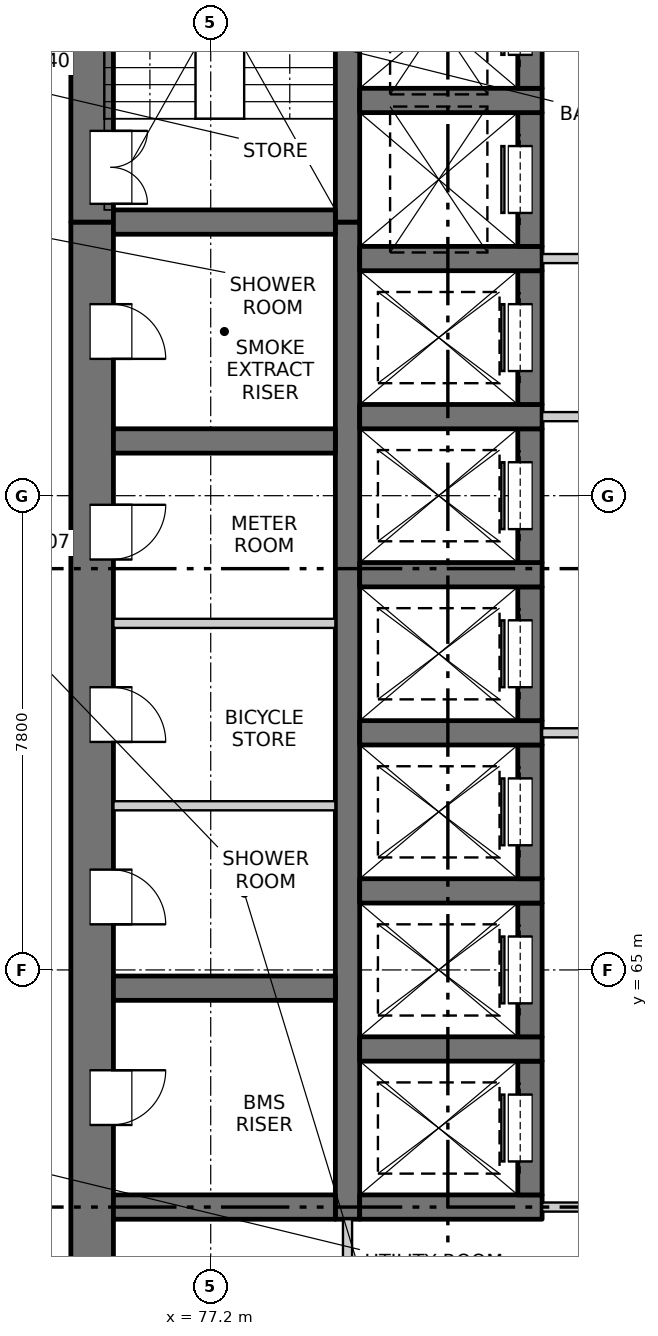
"""IFC4 building model, lengths in metres.
Left out: names, types, materials, properties, quantities, classifications, styles, units other than length and angle.
Written with IfcOpenShell. Run it as: python <this file> out.ifc"""

import sys

from ifc_helpers import new_model, si_unit, direction, frame, frame_2d, origin, place, context, subcontext, project, spatial, rectangle, extrude, element, fill, save


model = new_model("IFC4")
c1 = context("Model", 3, precision=1e-05, world=origin(), true_north=direction((0.0, 1.0)))
c2 = subcontext(c1, "Body", "Model", "MODEL_VIEW")
j1 = project(units=[si_unit("LENGTHUNIT", "METRE"), si_unit("PLANEANGLEUNIT", "RADIAN")], contexts=[c1])
p1 = place(None, origin())
s1 = spatial("IfcSite", under=j1, at=p1, CompositionType="ELEMENT")
p2 = place(p1, origin())
s2 = spatial("IfcBuilding", under=s1, at=p2, CompositionType="ELEMENT")
p3 = place(p2, frame((0.0, 0.0, 36.5)))
s3 = spatial("IfcBuildingStorey", under=s2, at=p3, CompositionType="ELEMENT", Elevation=36.5)
p4 = place(p3, frame((75.25, 54.9, -0.25), z_axis=(0.0, 0.0, 1.0), x_axis=(0.0, 1.0, 0.0)))
e1 = element("IfcWall", 1, at=p4, inside=s3, PredefinedType="SOLIDWALL", context=c2, shape_type="SweptSolid", body=[
    extrude(rectangle(XDim=22.4, YDim=0.7, at=frame_2d((11.2, 0.0))), origin(), (0.0, 0.0, 1.0), 3.4),
])
p5 = place(p4, frame((7.55, 0.0, 0.25)))
e2 = element("IfcOpeningElement", 2, at=p5, cuts=e1, PredefinedType="OPENING", context=c2, shape_type="SweptSolid", body=[
    extrude(rectangle(XDim=0.9, YDim=2.1, at=frame_2d((0.45, 1.05))), frame((0.0, 0.36, 0.0), z_axis=(0.0, -1.0, 0.0), x_axis=(1.0, 0.0, 0.0)), (0.0, 0.0, 1.0), 0.72),
])
p6 = place(p4, frame((10.85, 0.0, 0.25)))
e3 = element("IfcOpeningElement", 3, at=p6, cuts=e1, PredefinedType="OPENING", context=c2, shape_type="SweptSolid", body=[
    extrude(rectangle(XDim=0.9, YDim=2.1, at=frame_2d((0.45, 1.05))), frame((0.0, 0.36, 0.0), z_axis=(0.0, -1.0, 0.0), x_axis=(1.0, 0.0, 0.0)), (0.0, 0.0, 1.0), 0.72),
])
p7 = place(p4, frame((13.85, 0.0, 0.25)))
e4 = element("IfcOpeningElement", 4, at=p7, cuts=e1, PredefinedType="OPENING", context=c2, shape_type="SweptSolid", body=[
    extrude(rectangle(XDim=0.9, YDim=2.1, at=frame_2d((0.45, 1.05))), frame((0.0, 0.36, 0.0), z_axis=(0.0, -1.0, 0.0), x_axis=(1.0, 0.0, 0.0)), (0.0, 0.0, 1.0), 0.72),
])
p8 = place(p4, frame((16.85, 0.0, 0.25)))
e5 = element("IfcOpeningElement", 5, at=p8, cuts=e1, PredefinedType="OPENING", context=c2, shape_type="SweptSolid", body=[
    extrude(rectangle(XDim=0.9, YDim=2.1, at=frame_2d((0.45, 1.05))), frame((0.0, 0.36, 0.0), z_axis=(0.0, -1.0, 0.0), x_axis=(1.0, 0.0, 0.0)), (0.0, 0.0, 1.0), 0.72),
])
p9 = place(p4, frame((20.15, 0.0, 0.25)))
e6 = element("IfcOpeningElement", 6, at=p9, cuts=e1, PredefinedType="OPENING", context=c2, shape_type="SweptSolid", body=[
    extrude(rectangle(XDim=0.9, YDim=2.1, at=frame_2d((0.45, 1.05))), frame((0.0, 0.36, 0.0), z_axis=(0.0, -1.0, 0.0), x_axis=(1.0, 0.0, 0.0)), (0.0, 0.0, 1.0), 0.72),
])
p10 = place(p3, frame((75.25, 77.3, -0.25), z_axis=(0.0, 0.0, 1.0), x_axis=(0.0, 1.0, 0.0)))
e7 = element("IfcWall", 7, at=p10, inside=s3, PredefinedType="SOLIDWALL", context=c2, shape_type="SweptSolid", body=[
    extrude(rectangle(XDim=7.55, YDim=0.7, at=frame_2d((3.775, 0.0))), origin(), (0.0, 0.0, 1.0), 3.4),
])
p11 = place(p10, frame((0.3, 0.0, 0.25)))
e8 = element("IfcOpeningElement", 8, at=p11, cuts=e7, PredefinedType="OPENING", context=c2, shape_type="SweptSolid", body=[
    extrude(rectangle(XDim=1.2, YDim=2.1, at=frame_2d((0.6, 1.05))), frame((0.0, 0.36, 0.0), z_axis=(0.0, -1.0, 0.0), x_axis=(1.0, 0.0, 0.0)), (0.0, 0.0, 1.0), 0.72),
])
p12 = place(p3, frame((79.45, 60.9, -0.25), z_axis=(0.0, 0.0, 1.0), x_axis=(0.0, 1.0, 0.0)))
e9 = element("IfcWall", 9, at=p12, inside=s3, PredefinedType="SOLIDWALL", context=c2, shape_type="SweptSolid", body=[
    extrude(rectangle(XDim=16.4, YDim=0.4, at=frame_2d((8.2, 0.0))), origin(), (0.0, 0.0, 1.0), 3.4),
])
p13 = place(p3, frame((79.45, 77.3, -0.25), z_axis=(0.0, 0.0, 1.0), x_axis=(0.0, 1.0, 0.0)))
e10 = element("IfcWall", 10, at=p13, inside=s3, PredefinedType="SOLIDWALL", context=c2, shape_type="SweptSolid", body=[
    extrude(rectangle(XDim=6.85, YDim=0.4, at=frame_2d((3.425, 0.0))), origin(), (0.0, 0.0, 1.0), 3.4),
])
p14 = place(p3, frame((79.65, 61.1, -0.25), z_axis=(0.0, 0.0, 1.0), x_axis=(1.0, 0.0, 0.0)))
e11 = element("IfcWall", 11, at=p14, inside=s3, PredefinedType="SOLIDWALL", context=c2, shape_type="SweptSolid", body=[
    extrude(rectangle(XDim=3.0, YDim=0.4, at=frame_2d((1.5, 0.0))), origin(), (0.0, 0.0, 1.0), 3.4),
])
p15 = place(p3, frame((82.45, 61.3, -0.25), z_axis=(0.0, 0.0, 1.0), x_axis=(0.0, 1.0, 0.0)))
e12 = element("IfcWall", 12, at=p15, inside=s3, PredefinedType="SOLIDWALL", context=c2, shape_type="SweptSolid", body=[
    extrude(rectangle(XDim=2.2, YDim=0.4, at=frame_2d((1.1, 0.0))), origin(), (0.0, 0.0, 1.0), 3.4),
])
p16 = place(p15, frame((0.55, 0.0, 0.25)))
e13 = element("IfcOpeningElement", 13, at=p16, cuts=e12, PredefinedType="OPENING", context=c2, shape_type="SweptSolid", body=[
    extrude(rectangle(XDim=1.1, YDim=2.1, at=frame_2d((0.55, 1.05))), frame((0.0, 0.21, 0.0), z_axis=(0.0, -1.0, 0.0), x_axis=(1.0, 0.0, 0.0)), (0.0, 0.0, 1.0), 0.42),
])
p17 = place(p3, frame((79.65, 63.7, -0.25), z_axis=(0.0, 0.0, 1.0), x_axis=(1.0, 0.0, 0.0)))
e14 = element("IfcWall", 14, at=p17, inside=s3, PredefinedType="SOLIDWALL", context=c2, shape_type="SweptSolid", body=[
    extrude(rectangle(XDim=3.0, YDim=0.4, at=frame_2d((1.5, 0.0))), origin(), (0.0, 0.0, 1.0), 3.4),
])
p18 = place(p3, frame((82.45, 63.9, -0.25), z_axis=(0.0, 0.0, 1.0), x_axis=(0.0, 1.0, 0.0)))
e15 = element("IfcWall", 15, at=p18, inside=s3, PredefinedType="SOLIDWALL", context=c2, shape_type="SweptSolid", body=[
    extrude(rectangle(XDim=2.2, YDim=0.4, at=frame_2d((1.1, 0.0))), origin(), (0.0, 0.0, 1.0), 3.4),
])
p19 = place(p18, frame((0.55, 0.0, 0.25)))
e16 = element("IfcOpeningElement", 16, at=p19, cuts=e15, PredefinedType="OPENING", context=c2, shape_type="SweptSolid", body=[
    extrude(rectangle(XDim=1.1, YDim=2.1, at=frame_2d((0.55, 1.05))), frame((0.0, 0.21, 0.0), z_axis=(0.0, -1.0, 0.0), x_axis=(1.0, 0.0, 0.0)), (0.0, 0.0, 1.0), 0.42),
])
p20 = place(p3, frame((79.65, 66.3, -0.25), z_axis=(0.0, 0.0, 1.0), x_axis=(1.0, 0.0, 0.0)))
e17 = element("IfcWall", 17, at=p20, inside=s3, PredefinedType="SOLIDWALL", context=c2, shape_type="SweptSolid", body=[
    extrude(rectangle(XDim=3.0, YDim=0.4, at=frame_2d((1.5, 0.0))), origin(), (0.0, 0.0, 1.0), 3.4),
])
p21 = place(p3, frame((82.45, 66.5, -0.25), z_axis=(0.0, 0.0, 1.0), x_axis=(0.0, 1.0, 0.0)))
e18 = element("IfcWall", 18, at=p21, inside=s3, PredefinedType="SOLIDWALL", context=c2, shape_type="SweptSolid", body=[
    extrude(rectangle(XDim=2.2, YDim=0.4, at=frame_2d((1.1, 0.0))), origin(), (0.0, 0.0, 1.0), 3.4),
])
p22 = place(p21, frame((0.55, 0.0, 0.25)))
e19 = element("IfcOpeningElement", 19, at=p22, cuts=e18, PredefinedType="OPENING", context=c2, shape_type="SweptSolid", body=[
    extrude(rectangle(XDim=1.1, YDim=2.1, at=frame_2d((0.55, 1.05))), frame((0.0, 0.21, 0.0), z_axis=(0.0, -1.0, 0.0), x_axis=(1.0, 0.0, 0.0)), (0.0, 0.0, 1.0), 0.42),
])
p23 = place(p3, frame((79.65, 68.9, -0.25), z_axis=(0.0, 0.0, 1.0), x_axis=(1.0, 0.0, 0.0)))
e20 = element("IfcWall", 20, at=p23, inside=s3, PredefinedType="SOLIDWALL", context=c2, shape_type="SweptSolid", body=[
    extrude(rectangle(XDim=3.0, YDim=0.4, at=frame_2d((1.5, 0.0))), origin(), (0.0, 0.0, 1.0), 3.4),
])
p24 = place(p3, frame((82.45, 69.1, -0.25), z_axis=(0.0, 0.0, 1.0), x_axis=(0.0, 1.0, 0.0)))
e21 = element("IfcWall", 21, at=p24, inside=s3, PredefinedType="SOLIDWALL", context=c2, shape_type="SweptSolid", body=[
    extrude(rectangle(XDim=2.2, YDim=0.4, at=frame_2d((1.1, 0.0))), origin(), (0.0, 0.0, 1.0), 3.4),
])
p25 = place(p24, frame((0.55, 0.0, 0.25)))
e22 = element("IfcOpeningElement", 22, at=p25, cuts=e21, PredefinedType="OPENING", context=c2, shape_type="SweptSolid", body=[
    extrude(rectangle(XDim=1.1, YDim=2.1, at=frame_2d((0.55, 1.05))), frame((0.0, 0.21, 0.0), z_axis=(0.0, -1.0, 0.0), x_axis=(1.0, 0.0, 0.0)), (0.0, 0.0, 1.0), 0.42),
])
p26 = place(p3, frame((79.65, 71.5, -0.25), z_axis=(0.0, 0.0, 1.0), x_axis=(1.0, 0.0, 0.0)))
e23 = element("IfcWall", 23, at=p26, inside=s3, PredefinedType="SOLIDWALL", context=c2, shape_type="SweptSolid", body=[
    extrude(rectangle(XDim=3.0, YDim=0.4, at=frame_2d((1.5, 0.0))), origin(), (0.0, 0.0, 1.0), 3.4),
])
p27 = place(p3, frame((82.45, 71.7, -0.25), z_axis=(0.0, 0.0, 1.0), x_axis=(0.0, 1.0, 0.0)))
e24 = element("IfcWall", 24, at=p27, inside=s3, PredefinedType="SOLIDWALL", context=c2, shape_type="SweptSolid", body=[
    extrude(rectangle(XDim=2.2, YDim=0.4, at=frame_2d((1.1, 0.0))), origin(), (0.0, 0.0, 1.0), 3.4),
])
p28 = place(p27, frame((0.55, 0.0, 0.25)))
e25 = element("IfcOpeningElement", 25, at=p28, cuts=e24, PredefinedType="OPENING", context=c2, shape_type="SweptSolid", body=[
    extrude(rectangle(XDim=1.1, YDim=2.1, at=frame_2d((0.55, 1.05))), frame((0.0, 0.21, 0.0), z_axis=(0.0, -1.0, 0.0), x_axis=(1.0, 0.0, 0.0)), (0.0, 0.0, 1.0), 0.42),
])
p29 = place(p3, frame((79.65, 74.1, -0.25), z_axis=(0.0, 0.0, 1.0), x_axis=(1.0, 0.0, 0.0)))
e26 = element("IfcWall", 26, at=p29, inside=s3, PredefinedType="SOLIDWALL", context=c2, shape_type="SweptSolid", body=[
    extrude(rectangle(XDim=3.0, YDim=0.4, at=frame_2d((1.5, 0.0))), origin(), (0.0, 0.0, 1.0), 3.4),
])
p30 = place(p3, frame((82.45, 74.3, -0.25), z_axis=(0.0, 0.0, 1.0), x_axis=(0.0, 1.0, 0.0)))
e27 = element("IfcWall", 27, at=p30, inside=s3, PredefinedType="SOLIDWALL", context=c2, shape_type="SweptSolid", body=[
    extrude(rectangle(XDim=2.2, YDim=0.4, at=frame_2d((1.1, 0.0))), origin(), (0.0, 0.0, 1.0), 3.4),
])
p31 = place(p30, frame((0.55, 0.0, 0.25)))
e28 = element("IfcOpeningElement", 28, at=p31, cuts=e27, PredefinedType="OPENING", context=c2, shape_type="SweptSolid", body=[
    extrude(rectangle(XDim=1.1, YDim=2.1, at=frame_2d((0.55, 1.05))), frame((0.0, 0.21, 0.0), z_axis=(0.0, -1.0, 0.0), x_axis=(1.0, 0.0, 0.0)), (0.0, 0.0, 1.0), 0.42),
])
p32 = place(p3, frame((79.65, 76.7, -0.25), z_axis=(0.0, 0.0, 1.0), x_axis=(1.0, 0.0, 0.0)))
e29 = element("IfcWall", 29, at=p32, inside=s3, PredefinedType="SOLIDWALL", context=c2, shape_type="SweptSolid", body=[
    extrude(rectangle(XDim=3.0, YDim=0.4, at=frame_2d((1.5, 0.0))), origin(), (0.0, 0.0, 1.0), 3.4),
])
p33 = place(p3, frame((82.45, 76.9, -0.25), z_axis=(0.0, 0.0, 1.0), x_axis=(0.0, 1.0, 0.0)))
e30 = element("IfcWall", 30, at=p33, inside=s3, PredefinedType="SOLIDWALL", context=c2, shape_type="SweptSolid", body=[
    extrude(rectangle(XDim=2.2, YDim=0.4, at=frame_2d((1.1, 0.0))), origin(), (0.0, 0.0, 1.0), 3.4),
])
p34 = place(p33, frame((0.55, 0.0, 0.25)))
e31 = element("IfcOpeningElement", 31, at=p34, cuts=e30, PredefinedType="OPENING", context=c2, shape_type="SweptSolid", body=[
    extrude(rectangle(XDim=1.1, YDim=2.1, at=frame_2d((0.55, 1.05))), frame((0.0, 0.21, 0.0), z_axis=(0.0, -1.0, 0.0), x_axis=(1.0, 0.0, 0.0)), (0.0, 0.0, 1.0), 0.42),
])
p35 = place(p3, frame((79.65, 79.3, -0.25), z_axis=(0.0, 0.0, 1.0), x_axis=(1.0, 0.0, 0.0)))
e32 = element("IfcWall", 32, at=p35, inside=s3, PredefinedType="SOLIDWALL", context=c2, shape_type="SweptSolid", body=[
    extrude(rectangle(XDim=3.0, YDim=0.4, at=frame_2d((1.5, 0.0))), origin(), (0.0, 0.0, 1.0), 3.4),
])
p36 = place(p3, frame((82.45, 79.5, -0.25), z_axis=(0.0, 0.0, 1.0), x_axis=(0.0, 1.0, 0.0)))
e33 = element("IfcWall", 33, at=p36, inside=s3, PredefinedType="SOLIDWALL", context=c2, shape_type="SweptSolid", body=[
    extrude(rectangle(XDim=2.2, YDim=0.4, at=frame_2d((1.1, 0.0))), origin(), (0.0, 0.0, 1.0), 3.4),
])
p37 = place(p36, frame((0.55, 0.0, 0.25)))
e34 = element("IfcOpeningElement", 34, at=p37, cuts=e33, PredefinedType="OPENING", context=c2, shape_type="SweptSolid", body=[
    extrude(rectangle(XDim=1.1, YDim=2.1, at=frame_2d((0.55, 1.05))), frame((0.0, 0.21, 0.0), z_axis=(0.0, -1.0, 0.0), x_axis=(1.0, 0.0, 0.0)), (0.0, 0.0, 1.0), 0.42),
])
for number, where, z_axis, x_axis in (
    (35, (75.6, 61.1, -0.25), (0.0, 0.0, 1.0), (1.0, 0.0, 0.0)),
    (36, (75.6, 64.7, -0.25), (0.0, 0.0, 1.0), (1.0, 0.0, 0.0)),
    (37, (75.6, 73.7, -0.25), (0.0, 0.0, 1.0), (1.0, 0.0, 0.0)),
    (38, (75.6, 77.3, -0.25), (0.0, 0.0, 1.0), (1.0, 0.0, 0.0)),
):
    element("IfcWall", number, at=place(p3, frame(where, z_axis=z_axis, x_axis=x_axis)), inside=s3, PredefinedType="SOLIDWALL", context=c2, shape_type="SweptSolid", body=[
        extrude(rectangle(XDim=3.65, YDim=0.4, at=frame_2d((1.825, 0.0))), origin(), (0.0, 0.0, 1.0), 3.4),
    ])
p38 = place(p3, frame((82.65, 61.1, 0.0), z_axis=(0.0, 0.0, 1.0), x_axis=(1.0, 0.0, 0.0)))
e39 = element("IfcWall", 39, at=p38, inside=s3, PredefinedType="PARTITIONING", context=c2, shape_type="SweptSolid", body=[
    extrude(rectangle(XDim=4.7, YDim=0.15, at=frame_2d((2.35, 0.0))), origin(), (0.0, 0.0, 1.0), 3.15),
])
p39 = place(p38, frame((1.45, 0.0, 0.0)))
e40 = element("IfcOpeningElement", 40, at=p39, cuts=e39, PredefinedType="OPENING", context=c2, shape_type="SweptSolid", body=[
    extrude(rectangle(XDim=1.8, YDim=2.1, at=frame_2d((0.9, 1.05))), frame((0.0, 0.085, 0.0), z_axis=(0.0, -1.0, 0.0), x_axis=(1.0, 0.0, 0.0)), (0.0, 0.0, 1.0), 0.17),
])
p40 = place(p3, frame((75.6, 67.7, 0.0), z_axis=(0.0, 0.0, 1.0), x_axis=(1.0, 0.0, 0.0)))
e41 = element("IfcWall", 41, at=p40, inside=s3, PredefinedType="PARTITIONING", context=c2, shape_type="SweptSolid", body=[
    extrude(rectangle(XDim=3.65, YDim=0.15, at=frame_2d((1.825, 0.0))), origin(), (0.0, 0.0, 1.0), 3.15),
])
p41 = place(p3, frame((82.65, 68.9, 0.0), z_axis=(0.0, 0.0, 1.0), x_axis=(1.0, 0.0, 0.0)))
e42 = element("IfcWall", 42, at=p41, inside=s3, PredefinedType="PARTITIONING", context=c2, shape_type="SweptSolid", body=[
    extrude(rectangle(XDim=4.7, YDim=0.15, at=frame_2d((2.35, 0.0))), origin(), (0.0, 0.0, 1.0), 3.15),
])
p42 = place(p41, frame((1.45, 0.0, 0.0)))
e43 = element("IfcOpeningElement", 43, at=p42, cuts=e42, PredefinedType="OPENING", context=c2, shape_type="SweptSolid", body=[
    extrude(rectangle(XDim=1.8, YDim=2.1, at=frame_2d((0.9, 1.05))), frame((0.0, 0.085, 0.0), z_axis=(0.0, -1.0, 0.0), x_axis=(1.0, 0.0, 0.0)), (0.0, 0.0, 1.0), 0.17),
])
p43 = place(p3, frame((75.6, 70.7, 0.0), z_axis=(0.0, 0.0, 1.0), x_axis=(1.0, 0.0, 0.0)))
e44 = element("IfcWall", 44, at=p43, inside=s3, PredefinedType="PARTITIONING", context=c2, shape_type="SweptSolid", body=[
    extrude(rectangle(XDim=3.65, YDim=0.15, at=frame_2d((1.825, 0.0))), origin(), (0.0, 0.0, 1.0), 3.15),
])
p44 = place(p3, frame((82.65, 74.1, 0.0), z_axis=(0.0, 0.0, 1.0), x_axis=(1.0, 0.0, 0.0)))
e45 = element("IfcWall", 45, at=p44, inside=s3, PredefinedType="PARTITIONING", context=c2, shape_type="SweptSolid", body=[
    extrude(rectangle(XDim=4.7, YDim=0.15, at=frame_2d((2.35, 0.0))), origin(), (0.0, 0.0, 1.0), 3.15),
])
p45 = place(p44, frame((1.45, 0.0, 0.0)))
e46 = element("IfcOpeningElement", 46, at=p45, cuts=e45, PredefinedType="OPENING", context=c2, shape_type="SweptSolid", body=[
    extrude(rectangle(XDim=1.8, YDim=2.1, at=frame_2d((0.9, 1.05))), frame((0.0, 0.085, 0.0), z_axis=(0.0, -1.0, 0.0), x_axis=(1.0, 0.0, 0.0)), (0.0, 0.0, 1.0), 0.17),
])
p46 = place(p3, frame((82.65, 76.7, 0.0), z_axis=(0.0, 0.0, 1.0), x_axis=(1.0, 0.0, 0.0)))
e47 = element("IfcWall", 47, at=p46, inside=s3, PredefinedType="PARTITIONING", context=c2, shape_type="SweptSolid", body=[
    extrude(rectangle(XDim=4.7, YDim=0.15, at=frame_2d((2.35, 0.0))), origin(), (0.0, 0.0, 1.0), 3.15),
])
p47 = place(p46, frame((1.45, 0.0, 0.0)))
e48 = element("IfcOpeningElement", 48, at=p47, cuts=e47, PredefinedType="OPENING", context=c2, shape_type="SweptSolid", body=[
    extrude(rectangle(XDim=1.8, YDim=2.1, at=frame_2d((0.9, 1.05))), frame((0.0, 0.085, 0.0), z_axis=(0.0, -1.0, 0.0), x_axis=(1.0, 0.0, 0.0)), (0.0, 0.0, 1.0), 0.17),
])
p48 = place(p3, frame((79.45, 55.6, 0.0), z_axis=(0.0, 0.0, 1.0), x_axis=(0.0, 1.0, 0.0)))
e49 = element("IfcWall", 49, at=p48, inside=s3, PredefinedType="PARTITIONING", context=c2, shape_type="SweptSolid", body=[
    extrude(rectangle(XDim=5.3, YDim=0.15, at=frame_2d((2.65, 0.0))), origin(), (0.0, 0.0, 1.0), 3.15),
])
p49 = place(p48, frame((2.1, 0.0, 0.0)))
e50 = element("IfcOpeningElement", 50, at=p49, cuts=e49, PredefinedType="OPENING", context=c2, shape_type="SweptSolid", body=[
    extrude(rectangle(XDim=0.9, YDim=2.1, at=frame_2d((0.45, 1.05))), frame((0.0, 0.085, 0.0), z_axis=(0.0, -1.0, 0.0), x_axis=(1.0, 0.0, 0.0)), (0.0, 0.0, 1.0), 0.17),
])
p50 = place(p16, origin())
e51 = element("IfcDoor", 51, at=p50, inside=s3, OperationType="SLIDING_TO_RIGHT", PredefinedType="DOOR", context=c2, shape_type="SweptSolid", body=[
    extrude(rectangle(XDim=1.1, YDim=2.1, at=frame_2d((0.55, 1.05))), frame((0.0, 0.185, 0.0), z_axis=(0.0, -1.0, 0.0), x_axis=(1.0, 0.0, 0.0)), (0.0, 0.0, 1.0), 0.05),
])
fill(e13, e51)
p51 = place(p5, origin())
e52 = element("IfcDoor", 52, at=p51, inside=s3, OperationType="SINGLE_SWING_LEFT", PredefinedType="DOOR", context=c2, shape_type="SweptSolid", body=[
    extrude(rectangle(XDim=0.9, YDim=2.1, at=frame_2d((0.45, 1.05))), frame((0.0, -0.285, 0.0), z_axis=(0.0, -1.0, 0.0), x_axis=(1.0, 0.0, 0.0)), (0.0, 0.0, 1.0), 0.05),
])
fill(e2, e52)
p52 = place(p19, origin())
e53 = element("IfcDoor", 53, at=p52, inside=s3, OperationType="SLIDING_TO_RIGHT", PredefinedType="DOOR", context=c2, shape_type="SweptSolid", body=[
    extrude(rectangle(XDim=1.1, YDim=2.1, at=frame_2d((0.55, 1.05))), frame((0.0, 0.185, 0.0), z_axis=(0.0, -1.0, 0.0), x_axis=(1.0, 0.0, 0.0)), (0.0, 0.0, 1.0), 0.05),
])
fill(e16, e53)
p53 = place(p6, origin())
e54 = element("IfcDoor", 54, at=p53, inside=s3, OperationType="SINGLE_SWING_RIGHT", PredefinedType="DOOR", context=c2, shape_type="SweptSolid", body=[
    extrude(rectangle(XDim=0.9, YDim=2.1, at=frame_2d((0.45, 1.05))), frame((0.0, -0.285, 0.0), z_axis=(0.0, -1.0, 0.0), x_axis=(1.0, 0.0, 0.0)), (0.0, 0.0, 1.0), 0.05),
])
fill(e3, e54)
p54 = place(p22, origin())
e55 = element("IfcDoor", 55, at=p54, inside=s3, OperationType="SLIDING_TO_RIGHT", PredefinedType="DOOR", context=c2, shape_type="SweptSolid", body=[
    extrude(rectangle(XDim=1.1, YDim=2.1, at=frame_2d((0.55, 1.05))), frame((0.0, 0.185, 0.0), z_axis=(0.0, -1.0, 0.0), x_axis=(1.0, 0.0, 0.0)), (0.0, 0.0, 1.0), 0.05),
])
fill(e19, e55)
p55 = place(p7, origin())
e56 = element("IfcDoor", 56, at=p55, inside=s3, OperationType="SINGLE_SWING_RIGHT", PredefinedType="DOOR", context=c2, shape_type="SweptSolid", body=[
    extrude(rectangle(XDim=0.9, YDim=2.1, at=frame_2d((0.45, 1.05))), frame((0.0, -0.285, 0.0), z_axis=(0.0, -1.0, 0.0), x_axis=(1.0, 0.0, 0.0)), (0.0, 0.0, 1.0), 0.05),
])
fill(e4, e56)
p56 = place(p25, origin())
e57 = element("IfcDoor", 57, at=p56, inside=s3, OperationType="SLIDING_TO_LEFT", PredefinedType="DOOR", context=c2, shape_type="SweptSolid", body=[
    extrude(rectangle(XDim=1.1, YDim=2.1, at=frame_2d((0.55, 1.05))), frame((0.0, 0.185, 0.0), z_axis=(0.0, -1.0, 0.0), x_axis=(1.0, 0.0, 0.0)), (0.0, 0.0, 1.0), 0.05),
])
fill(e22, e57)
p57 = place(p8, origin())
e58 = element("IfcDoor", 58, at=p57, inside=s3, OperationType="SINGLE_SWING_LEFT", PredefinedType="DOOR", context=c2, shape_type="SweptSolid", body=[
    extrude(rectangle(XDim=0.9, YDim=2.1, at=frame_2d((0.45, 1.05))), frame((0.0, -0.285, 0.0), z_axis=(0.0, -1.0, 0.0), x_axis=(1.0, 0.0, 0.0)), (0.0, 0.0, 1.0), 0.05),
])
fill(e5, e58)
p58 = place(p28, origin())
e59 = element("IfcDoor", 59, at=p58, inside=s3, OperationType="SLIDING_TO_LEFT", PredefinedType="DOOR", context=c2, shape_type="SweptSolid", body=[
    extrude(rectangle(XDim=1.1, YDim=2.1, at=frame_2d((0.55, 1.05))), frame((0.0, 0.185, 0.0), z_axis=(0.0, -1.0, 0.0), x_axis=(1.0, 0.0, 0.0)), (0.0, 0.0, 1.0), 0.05),
])
fill(e25, e59)
p59 = place(p31, origin())
e60 = element("IfcDoor", 60, at=p59, inside=s3, OperationType="SLIDING_TO_LEFT", PredefinedType="DOOR", context=c2, shape_type="SweptSolid", body=[
    extrude(rectangle(XDim=1.1, YDim=2.1, at=frame_2d((0.55, 1.05))), frame((0.0, 0.185, 0.0), z_axis=(0.0, -1.0, 0.0), x_axis=(1.0, 0.0, 0.0)), (0.0, 0.0, 1.0), 0.05),
])
fill(e28, e60)
p60 = place(p9, origin())
e61 = element("IfcDoor", 61, at=p60, inside=s3, OperationType="SINGLE_SWING_RIGHT", PredefinedType="DOOR", context=c2, shape_type="SweptSolid", body=[
    extrude(rectangle(XDim=0.9, YDim=2.1, at=frame_2d((0.45, 1.05))), frame((0.0, -0.285, 0.0), z_axis=(0.0, -1.0, 0.0), x_axis=(1.0, 0.0, 0.0)), (0.0, 0.0, 1.0), 0.05),
])
fill(e6, e61)
p61 = place(p34, origin())
e62 = element("IfcDoor", 62, at=p61, inside=s3, OperationType="SLIDING_TO_LEFT", PredefinedType="DOOR", context=c2, shape_type="SweptSolid", body=[
    extrude(rectangle(XDim=1.1, YDim=2.1, at=frame_2d((0.55, 1.05))), frame((0.0, 0.185, 0.0), z_axis=(0.0, -1.0, 0.0), x_axis=(1.0, 0.0, 0.0)), (0.0, 0.0, 1.0), 0.05),
])
fill(e31, e62)
p62 = place(p11, origin())
e63 = element("IfcDoor", 63, at=p62, inside=s3, OperationType="DOUBLE_DOOR_SINGLE_SWING", PredefinedType="DOOR", context=c2, shape_type="SweptSolid", body=[
    extrude(rectangle(XDim=1.2, YDim=2.1, at=frame_2d((0.6, 1.05))), frame((0.0, -0.285, 0.0), z_axis=(0.0, -1.0, 0.0), x_axis=(1.0, 0.0, 0.0)), (0.0, 0.0, 1.0), 0.05),
])
fill(e8, e63)
p63 = place(p37, origin())
e64 = element("IfcDoor", 64, at=p63, inside=s3, OperationType="SLIDING_TO_LEFT", PredefinedType="DOOR", context=c2, shape_type="SweptSolid", body=[
    extrude(rectangle(XDim=1.1, YDim=2.1, at=frame_2d((0.55, 1.05))), frame((0.0, 0.185, 0.0), z_axis=(0.0, -1.0, 0.0), x_axis=(1.0, 0.0, 0.0)), (0.0, 0.0, 1.0), 0.05),
])
fill(e34, e64)
save(model, sys.argv[1])
